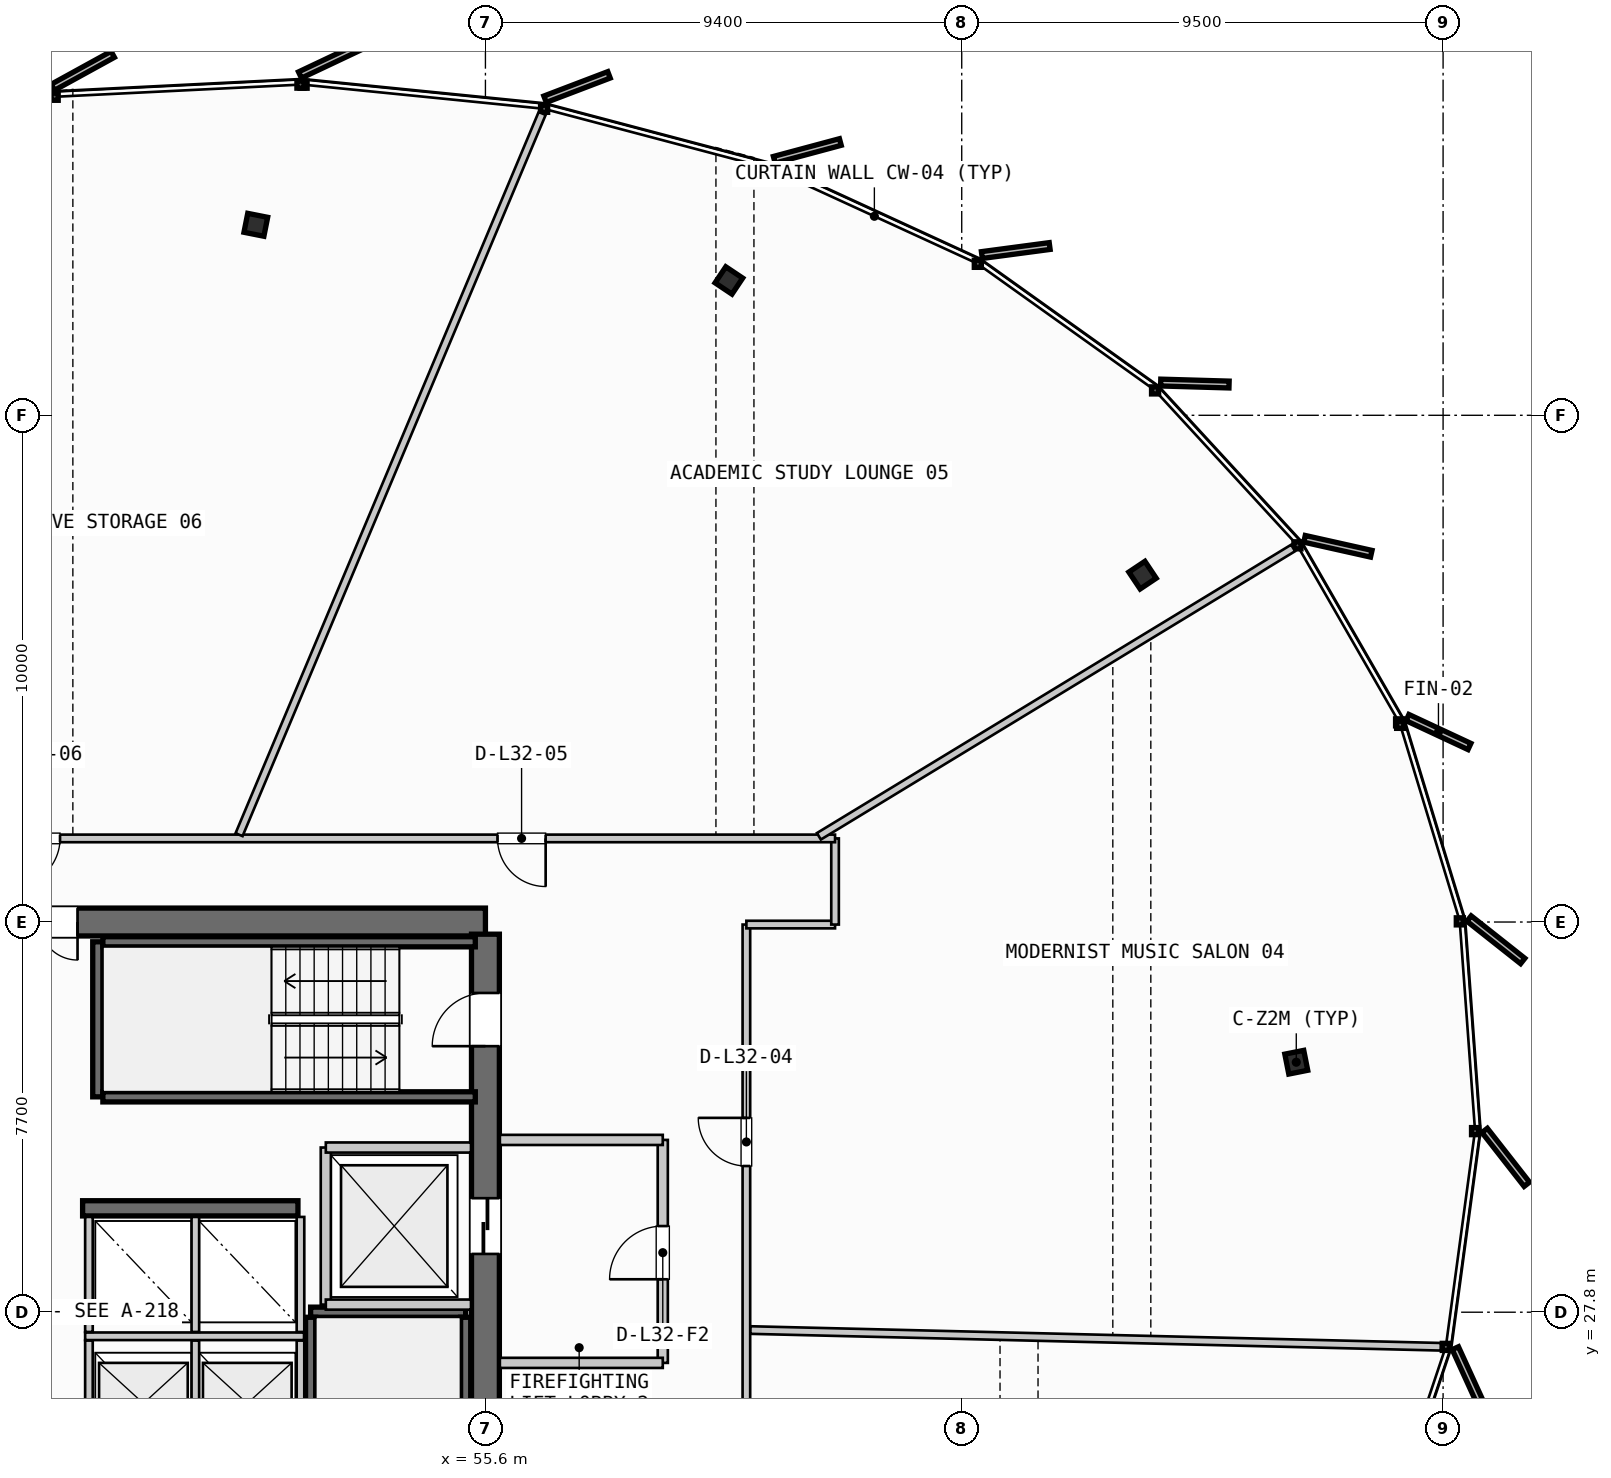
"""IFC4 building model, lengths in metres.
Left out: names, types, materials, properties, quantities, classifications, styles, units other than length and angle.
Written with IfcOpenShell. Run it as: python <this file> out.ifc"""

import sys

from ifc_helpers import new_model, si_unit, direction, frame, frame_2d, origin, origin_2d, place, context, subcontext, project, spatial, rectangle, i_section, extrude, source, transform, mapped, element, fill, save


model = new_model("IFC4")
c1 = context("Model", 3, precision=1e-05, world=origin(), true_north=direction((0.0, 1.0)))
c2 = subcontext(c1, "Body", "Model", "MODEL_VIEW")
j1 = project(units=[si_unit("LENGTHUNIT", "METRE"), si_unit("PLANEANGLEUNIT", "RADIAN")], contexts=[c1])
p1 = place(None, origin())
s1 = spatial("IfcSite", under=j1, at=p1, CompositionType="ELEMENT")
p2 = place(p1, origin())
s2 = spatial("IfcBuilding", under=s1, at=p2, CompositionType="ELEMENT")
p3 = place(p2, frame((0.0, 0.0, 128.8)))
s3 = spatial("IfcBuildingStorey", under=s2, at=p3, CompositionType="ELEMENT", Elevation=128.8)
p4 = place(p3, frame((55.6, 35.5, 0.0), z_axis=(0.0, 0.0, 1.0), x_axis=(-1.0, 0.0, 0.0)))
e1 = element("IfcWall", 1, at=p4, inside=s3, PredefinedType="SHEAR", context=c2, shape_type="SweptSolid", body=[
    extrude(rectangle(XDim=17.6, YDim=0.55, at=frame_2d((8.8, 0.0))), origin(), (0.0, 0.0, 1.0), 3.3),
])
p5 = place(p4, frame((8.05, 0.0, 0.0)))
e2 = element("IfcOpeningElement", 2, at=p5, cuts=e1, PredefinedType="OPENING", context=c2, shape_type="SweptSolid", body=[
    extrude(rectangle(XDim=1.5, YDim=2.2, at=frame_2d((0.75, 1.1))), frame((0.0, 0.285, 0.0), z_axis=(0.0, -1.0, 0.0), x_axis=(1.0, 0.0, 0.0)), (0.0, 0.0, 1.0), 0.57),
])
p6 = place(p4, frame((14.95, 0.0, 0.0)))
e3 = element("IfcOpeningElement", 3, at=p6, cuts=e1, PredefinedType="OPENING", context=c2, shape_type="SweptSolid", body=[
    extrude(rectangle(XDim=1.4, YDim=2.3, at=frame_2d((0.7, 1.15))), frame((0.0, 0.285, 0.0), z_axis=(0.0, -1.0, 0.0), x_axis=(1.0, 0.0, 0.0)), (0.0, 0.0, 1.0), 0.57),
])
p7 = place(p4, frame((12.9, 0.0, 0.0)))
e4 = element("IfcOpeningElement", 4, at=p7, cuts=e1, PredefinedType="OPENING", context=c2, shape_type="SweptSolid", body=[
    extrude(rectangle(XDim=0.9, YDim=2.15, at=frame_2d((0.45, 1.075))), frame((0.0, 0.285, 0.0), z_axis=(0.0, -1.0, 0.0), x_axis=(1.0, 0.0, 0.0)), (0.0, 0.0, 1.0), 0.57),
])
p8 = place(p4, frame((10.6, 0.0, 0.0)))
e5 = element("IfcOpeningElement", 5, at=p8, cuts=e1, PredefinedType="OPENING", context=c2, shape_type="SweptSolid", body=[
    extrude(rectangle(XDim=0.95, YDim=2.15, at=frame_2d((0.475, 1.075))), frame((0.0, 0.285, 0.0), z_axis=(0.0, -1.0, 0.0), x_axis=(1.0, 0.0, 0.0)), (0.0, 0.0, 1.0), 0.57),
])
p9 = place(p3, frame((55.6, 20.34, 0.0), z_axis=(0.0, 0.0, 1.0), x_axis=(0.0, 1.0, 0.0)))
e6 = element("IfcWall", 6, at=p9, inside=s3, PredefinedType="SHEAR", context=c2, shape_type="SweptSolid", body=[
    extrude(rectangle(XDim=14.92, YDim=0.55, at=frame_2d((7.46, 0.0))), origin(), (0.0, 0.0, 1.0), 3.3),
])
p10 = place(p9, frame((12.71, 0.0, 0.0)))
e7 = element("IfcOpeningElement", 7, at=p10, cuts=e6, PredefinedType="OPENING", context=c2, shape_type="SweptSolid", body=[
    extrude(rectangle(XDim=1.05, YDim=2.15, at=frame_2d((0.525, 1.075))), frame((0.0, 0.285, 0.0), z_axis=(0.0, -1.0, 0.0), x_axis=(1.0, 0.0, 0.0)), (0.0, 0.0, 1.0), 0.57),
])
p11 = place(p9, frame((8.61, 0.0, 0.0)))
e8 = element("IfcOpeningElement", 8, at=p11, cuts=e6, PredefinedType="OPENING", context=c2, shape_type="SweptSolid", body=[
    extrude(rectangle(XDim=1.1, YDim=2.2, at=frame_2d((0.55, 1.1))), frame((0.0, 0.285, 0.0), z_axis=(0.0, -1.0, 0.0), x_axis=(1.0, 0.0, 0.0)), (0.0, 0.0, 1.0), 0.57),
])
p12 = place(p3, frame((47.65, 29.85, 0.0), z_axis=(0.0, 0.0, 1.0), x_axis=(1.0, 0.0, 0.0)))
e9 = element("IfcWall", 9, at=p12, inside=s3, PredefinedType="SHEAR", context=c2, shape_type="SweptSolid", body=[
    extrude(rectangle(XDim=4.25, YDim=0.3, at=frame_2d((2.125, 0.0))), origin(), (0.0, 0.0, 1.0), 3.3),
])
m1 = source(origin(), c2, "Body", "SweptSolid", [
    extrude(i_section(OverallWidth=0.401, OverallDepth=0.381, WebThickness=0.032, FlangeThickness=0.051, FilletRadius=0.015, at=origin_2d()), origin(), (0.0, 0.0, 1.0), 3.3),
])
for number, where, z_axis, x_axis in (
    (10, (71.603, 32.733, 0.0), (0.0, 0.0, 1.0), (0.981, 0.195, 0.0)),
    (11, (68.569, 42.345, 0.0), (0.0, 0.0, 1.0), (0.831, 0.556, 0.0)),
    (12, (60.405, 48.161, 0.0), (0.0, 0.0, 1.0), (0.556, 0.831, 0.0)),
    (13, (51.069, 49.259, 0.0), (0.0, 0.0, 1.0), (0.195, 0.981, 0.0)),
):
    element("IfcColumn", number, at=place(p3, frame(where, z_axis=z_axis, x_axis=x_axis)), inside=s3, PredefinedType="COLUMN", context=c2, shape_type="MappedRepresentation", body=[
        mapped(m1, transform((0.0, 0.0, 0.0), scale=1.0)),
    ])
p13 = place(p3, frame((52.15, 27.8, 0.0), z_axis=(0.0, 0.0, 1.0), x_axis=(1.0, 0.0, 0.0)))
e14 = element("IfcWall", 14, at=p13, inside=s3, PredefinedType="SHEAR", context=c2, shape_type="SweptSolid", body=[
    extrude(rectangle(XDim=3.06, YDim=0.2, at=frame_2d((1.53, 0.0))), origin(), (0.0, 0.0, 1.0), 3.3),
])
for number, where, z_axis, x_axis in (
    (15, (55.21, 27.7, 0.0), (0.0, 0.0, 1.0), (0.0, -1.0, 0.0)),
    (16, (52.15, 20.35, 0.0), (0.0, 0.0, 1.0), (0.0, 1.0, 0.0)),
):
    element("IfcWall", number, at=place(p3, frame(where, z_axis=z_axis, x_axis=x_axis)), inside=s3, PredefinedType="SHEAR", context=c2, shape_type="SweptSolid", body=[
        extrude(rectangle(XDim=7.35, YDim=0.2, at=frame_2d((3.675, 0.0))), origin(), (0.0, 0.0, 1.0), 3.3),
    ])
p14 = place(p3, frame((47.95, 32.05, 0.0), z_axis=(0.0, 0.0, 1.0), x_axis=(0.0, 1.0, 0.0)))
e17 = element("IfcWall", 17, at=p14, inside=s3, PredefinedType="SHEAR", context=c2, shape_type="SweptSolid", body=[
    extrude(rectangle(XDim=3.06, YDim=0.2, at=frame_2d((1.53, 0.0))), origin(), (0.0, 0.0, 1.0), 3.3),
])
for number, where, z_axis, x_axis in (
    (18, (48.05, 35.11, 0.0), (0.0, 0.0, 1.0), (1.0, 0.0, 0.0)),
    (19, (55.4, 32.05, 0.0), (0.0, 0.0, 1.0), (-1.0, 0.0, 0.0)),
):
    element("IfcWall", number, at=place(p3, frame(where, z_axis=z_axis, x_axis=x_axis)), inside=s3, PredefinedType="SHEAR", context=c2, shape_type="SweptSolid", body=[
        extrude(rectangle(XDim=7.35, YDim=0.2, at=frame_2d((3.675, 0.0))), origin(), (0.0, 0.0, 1.0), 3.3),
    ])
p15 = place(p3, frame((52.45, 27.95, 0.0), z_axis=(0.0, 0.0, 1.0), x_axis=(0.0, 1.0, 0.0)))
e20 = element("IfcWall", 20, at=p15, inside=s3, PredefinedType="PARTITIONING", context=c2, shape_type="SweptSolid", body=[
    extrude(rectangle(XDim=3.1, YDim=0.2, at=frame_2d((1.55, 0.0))), origin(), (0.0, 0.0, 1.0), 2.445),
])
for number, where, z_axis, x_axis in (
    (21, (52.45, 27.95, 0.0), (0.0, 0.0, 1.0), (1.0, 0.0, 0.0)),
    (22, (52.45, 31.05, 0.0), (0.0, 0.0, 1.0), (1.0, 0.0, 0.0)),
):
    element("IfcWall", number, at=place(p3, frame(where, z_axis=z_axis, x_axis=x_axis)), inside=s3, PredefinedType="PARTITIONING", context=c2, shape_type="SweptSolid", body=[
        extrude(rectangle(XDim=2.865, YDim=0.2, at=frame_2d((1.433, 0.0))), origin(), (0.0, 0.0, 1.0), 2.445),
    ])
p16 = place(p3, frame((59.1, 26.8, 0.0), z_axis=(0.0, 0.0, 1.0), x_axis=(0.0, 1.0, 0.0)))
e23 = element("IfcWall", 23, at=p16, inside=s3, PredefinedType="PARTITIONING", context=c2, shape_type="SweptSolid", body=[
    extrude(rectangle(XDim=4.4, YDim=0.2, at=frame_2d((2.2, 0.0))), origin(), (0.0, 0.0, 1.0), 2.445),
])
p17 = place(p16, frame((1.65, 0.0, 0.0)))
e24 = element("IfcOpeningElement", 24, at=p17, cuts=e23, PredefinedType="OPENING", context=c2, shape_type="SweptSolid", body=[
    extrude(rectangle(XDim=1.05, YDim=2.15, at=frame_2d((0.525, 1.075))), frame((0.0, 0.11, 0.0), z_axis=(0.0, -1.0, 0.0), x_axis=(1.0, 0.0, 0.0)), (0.0, 0.0, 1.0), 0.22),
])
for number, where, z_axis, x_axis in (
    (25, (55.885, 26.8, 0.0), (0.0, 0.0, 1.0), (1.0, 0.0, 0.0)),
    (26, (55.885, 31.2, 0.0), (0.0, 0.0, 1.0), (1.0, 0.0, 0.0)),
):
    element("IfcWall", number, at=place(p3, frame(where, z_axis=z_axis, x_axis=x_axis)), inside=s3, PredefinedType="PARTITIONING", context=c2, shape_type="SweptSolid", body=[
        extrude(rectangle(XDim=3.215, YDim=0.2, at=frame_2d((1.607, 0.0))), origin(), (0.0, 0.0, 1.0), 2.445),
    ])
p18 = place(p3, frame((47.7, 27.325, 0.0), z_axis=(0.0, 0.0, 1.0), x_axis=(1.0, 0.0, 0.0)))
e27 = element("IfcWall", 27, at=p18, inside=s3, PredefinedType="PARTITIONING", context=c2, shape_type="SweptSolid", body=[
    extrude(rectangle(XDim=4.32, YDim=0.15, at=frame_2d((2.16, 0.0))), origin(), (0.0, 0.0, 1.0), 2.445),
])
for number, where, z_axis, x_axis in (
    (28, (47.775, 24.92, 0.0), (0.0, 0.0, 1.0), (0.0, 1.0, 0.0)),
    (29, (49.875, 24.92, 0.0), (0.0, 0.0, 1.0), (0.0, 1.0, 0.0)),
    (30, (51.95, 24.92, 0.0), (0.0, 0.0, 1.0), (0.0, 1.0, 0.0)),
):
    element("IfcWall", number, at=place(p3, frame(where, z_axis=z_axis, x_axis=x_axis)), inside=s3, PredefinedType="PARTITIONING", context=c2, shape_type="SweptSolid", body=[
        extrude(rectangle(XDim=2.32, YDim=0.15, at=frame_2d((1.16, 0.0))), origin(), (0.0, 0.0, 1.0), 2.445),
    ])
for number, where, z_axis, x_axis in (
    (31, (47.775, 27.41, 0.0), (0.0, 0.0, 1.0), (0.0, 1.0, 0.0)),
    (32, (49.875, 27.41, 0.0), (0.0, 0.0, 1.0), (0.0, 1.0, 0.0)),
    (33, (51.95, 27.41, 0.0), (0.0, 0.0, 1.0), (0.0, 1.0, 0.0)),
):
    element("IfcWall", number, at=place(p3, frame(where, z_axis=z_axis, x_axis=x_axis)), inside=s3, PredefinedType="PARTITIONING", context=c2, shape_type="SweptSolid", body=[
        extrude(rectangle(XDim=2.27, YDim=0.15, at=frame_2d((1.135, 0.0))), origin(), (0.0, 0.0, 1.0), 2.445),
    ])
p19 = place(p3, frame((60.75, 20.15, 0.0), z_axis=(0.0, 0.0, 1.0), x_axis=(0.0, 1.0, 0.0)))
e34 = element("IfcWall", 34, at=p19, inside=s3, PredefinedType="PARTITIONING", context=c2, shape_type="SweptSolid", body=[
    extrude(rectangle(XDim=15.3, YDim=0.15, at=frame_2d((7.65, 0.0))), origin(), (0.0, 0.0, 1.0), 2.445),
])
p20 = place(p19, frame((3.465, 0.0, 0.0)))
e35 = element("IfcOpeningElement", 35, at=p20, cuts=e34, PredefinedType="OPENING", context=c2, shape_type="SweptSolid", body=[
    extrude(rectangle(XDim=0.95, YDim=2.15, at=frame_2d((0.475, 1.075))), frame((0.0, 0.085, 0.0), z_axis=(0.0, -1.0, 0.0), x_axis=(1.0, 0.0, 0.0)), (0.0, 0.0, 1.0), 0.17),
])
p21 = place(p19, frame((10.535, 0.0, 0.0)))
e36 = element("IfcOpeningElement", 36, at=p21, cuts=e34, PredefinedType="OPENING", context=c2, shape_type="SweptSolid", body=[
    extrude(rectangle(XDim=0.95, YDim=2.15, at=frame_2d((0.475, 1.075))), frame((0.0, 0.085, 0.0), z_axis=(0.0, -1.0, 0.0), x_axis=(1.0, 0.0, 0.0)), (0.0, 0.0, 1.0), 0.17),
])
p22 = place(p3, frame((60.75, 35.45, 0.0), z_axis=(0.0, 0.0, 1.0), x_axis=(1.0, 0.0, 0.0)))
e37 = element("IfcWall", 37, at=p22, inside=s3, PredefinedType="PARTITIONING", context=c2, shape_type="SweptSolid", body=[
    extrude(rectangle(XDim=1.75, YDim=0.15, at=frame_2d((0.875, 0.0))), origin(), (0.0, 0.0, 1.0), 2.445),
])
p23 = place(p3, frame((62.5, 35.45, 0.0), z_axis=(0.0, 0.0, 1.0), x_axis=(0.0, 1.0, 0.0)))
e38 = element("IfcWall", 38, at=p23, inside=s3, PredefinedType="PARTITIONING", context=c2, shape_type="SweptSolid", body=[
    extrude(rectangle(XDim=1.7, YDim=0.15, at=frame_2d((0.85, 0.0))), origin(), (0.0, 0.0, 1.0), 2.445),
])
p24 = place(p3, frame((62.5, 37.15, 0.0), z_axis=(0.0, 0.0, 1.0), x_axis=(-1.0, 0.0, 0.0)))
e39 = element("IfcWall", 39, at=p24, inside=s3, PredefinedType="PARTITIONING", context=c2, shape_type="SweptSolid", body=[
    extrude(rectangle(XDim=31.4, YDim=0.15, at=frame_2d((15.7, 0.0))), origin(), (0.0, 0.0, 1.0), 2.445),
])
p25 = place(p24, frame((5.711, 0.0, 0.0)))
e40 = element("IfcOpeningElement", 40, at=p25, cuts=e39, PredefinedType="OPENING", context=c2, shape_type="SweptSolid", body=[
    extrude(rectangle(XDim=0.95, YDim=2.15, at=frame_2d((0.475, 1.075))), frame((0.0, 0.085, 0.0), z_axis=(0.0, -1.0, 0.0), x_axis=(1.0, 0.0, 0.0)), (0.0, 0.0, 1.0), 0.17),
])
p26 = place(p24, frame((15.295, 0.0, 0.0)))
e41 = element("IfcOpeningElement", 41, at=p26, cuts=e39, PredefinedType="OPENING", context=c2, shape_type="SweptSolid", body=[
    extrude(rectangle(XDim=0.95, YDim=2.15, at=frame_2d((0.475, 1.075))), frame((0.0, 0.085, 0.0), z_axis=(0.0, -1.0, 0.0), x_axis=(1.0, 0.0, 0.0)), (0.0, 0.0, 1.0), 0.17),
])
p27 = place(p24, frame((22.388, 0.0, 0.0)))
e42 = element("IfcOpeningElement", 42, at=p27, cuts=e39, PredefinedType="OPENING", context=c2, shape_type="SweptSolid", body=[
    extrude(rectangle(XDim=0.95, YDim=2.15, at=frame_2d((0.475, 1.075))), frame((0.0, 0.085, 0.0), z_axis=(0.0, -1.0, 0.0), x_axis=(1.0, 0.0, 0.0)), (0.0, 0.0, 1.0), 0.17),
])
p28 = place(p3, frame((60.83, 27.448, 0.0), z_axis=(0.0, 0.0, 1.0), x_axis=(0.999707062654, -0.02420307585, 0.0)))
e43 = element("IfcWall", 43, at=p28, inside=s3, PredefinedType="PARTITIONING", context=c2, shape_type="SweptSolid", body=[
    extrude(rectangle(XDim=13.628, YDim=0.15, at=frame_2d((6.814, 0.0))), origin(), (0.0, 0.0, 1.0), 2.445),
])
p29 = place(p3, frame((62.181, 37.192, 0.0), z_axis=(0.0, 0.0, 1.0), x_axis=(0.854469173074, 0.519502100348, 0.0)))
e44 = element("IfcWall", 44, at=p29, inside=s3, PredefinedType="PARTITIONING", context=c2, shape_type="SweptSolid", body=[
    extrude(rectangle(XDim=10.953, YDim=0.15, at=frame_2d((5.477, 0.0))), origin(), (0.0, 0.0, 1.0), 2.445),
])
p30 = place(p3, frame((50.738, 37.224, 0.0), z_axis=(0.0, 0.0, 1.0), x_axis=(0.387456696023, 0.921887904632, 0.0)))
e45 = element("IfcWall", 45, at=p30, inside=s3, PredefinedType="PARTITIONING", context=c2, shape_type="SweptSolid", body=[
    extrude(rectangle(XDim=15.438, YDim=0.15, at=frame_2d((7.719, 0.0))), origin(), (0.0, 0.0, 1.0), 2.445),
])
m2 = source(origin(), c2, "Body", "SweptSolid", [
    extrude(rectangle(XDim=1.05, YDim=2.15, at=frame_2d((0.525, 1.075))), frame((0.0, 0.025, 0.0), z_axis=(0.0, -1.0, 0.0), x_axis=(1.0, 0.0, 0.0)), (0.0, 0.0, 1.0), 0.05),
])
p31 = place(p10, origin())
e46 = element("IfcDoor", 46, at=p31, inside=s3, OperationType="SINGLE_SWING_LEFT", PredefinedType="DOOR", context=c2, shape_type="MappedRepresentation", body=[
    mapped(m2, transform((0.0, 0.0, 0.0), scale=1.0)),
])
fill(e7, e46)
m3 = source(origin(), c2, "Body", "SweptSolid", [
    extrude(rectangle(XDim=1.5, YDim=2.2, at=frame_2d((0.75, 1.1))), frame((0.0, 0.025, 0.0), z_axis=(0.0, -1.0, 0.0), x_axis=(1.0, 0.0, 0.0)), (0.0, 0.0, 1.0), 0.05),
])
p32 = place(p5, origin())
e47 = element("IfcDoor", 47, at=p32, inside=s3, OperationType="DOUBLE_DOOR_SINGLE_SWING", PredefinedType="DOOR", context=c2, shape_type="MappedRepresentation", body=[
    mapped(m3, transform((0.0, 0.0, 0.0), scale=1.0)),
])
fill(e2, e47)
m4 = source(origin(), c2, "Body", "SweptSolid", [
    extrude(rectangle(XDim=1.1, YDim=2.2, at=frame_2d((0.55, 1.1))), frame((0.0, 0.025, 0.0), z_axis=(0.0, -1.0, 0.0), x_axis=(1.0, 0.0, 0.0)), (0.0, 0.0, 1.0), 0.05),
])
p33 = place(p11, origin())
e48 = element("IfcDoor", 48, at=p33, inside=s3, OperationType="SLIDING_TO_RIGHT", PredefinedType="DOOR", context=c2, shape_type="MappedRepresentation", body=[
    mapped(m4, transform((0.0, 0.0, 0.0), scale=1.0)),
])
fill(e8, e48)
p34 = place(p17, origin())
e49 = element("IfcDoor", 49, at=p34, inside=s3, OperationType="SINGLE_SWING_LEFT", PredefinedType="DOOR", context=c2, shape_type="MappedRepresentation", body=[
    mapped(m2, transform((0.0, 0.0, 0.0), scale=1.0)),
])
fill(e24, e49)
m5 = source(origin(), c2, "Body", "SweptSolid", [
    extrude(rectangle(XDim=0.95, YDim=2.15, at=frame_2d((0.475, 1.075))), frame((0.0, 0.025, 0.0), z_axis=(0.0, -1.0, 0.0), x_axis=(1.0, 0.0, 0.0)), (0.0, 0.0, 1.0), 0.05),
])
p35 = place(p21, origin())
e50 = element("IfcDoor", 50, at=p35, inside=s3, OperationType="SINGLE_SWING_RIGHT", PredefinedType="DOOR", context=c2, shape_type="MappedRepresentation", body=[
    mapped(m5, transform((0.0, 0.0, 0.0), scale=1.0)),
])
fill(e36, e50)
p36 = place(p25, origin())
e51 = element("IfcDoor", 51, at=p36, inside=s3, OperationType="SINGLE_SWING_LEFT", PredefinedType="DOOR", context=c2, shape_type="MappedRepresentation", body=[
    mapped(m5, transform((0.0, 0.0, 0.0), scale=1.0)),
])
fill(e40, e51)
p37 = place(p26, origin())
e52 = element("IfcDoor", 52, at=p37, inside=s3, OperationType="SINGLE_SWING_RIGHT", PredefinedType="DOOR", context=c2, shape_type="MappedRepresentation", body=[
    mapped(m5, transform((0.0, 0.0, 0.0), scale=1.0)),
])
fill(e41, e52)
save(model, sys.argv[1])
